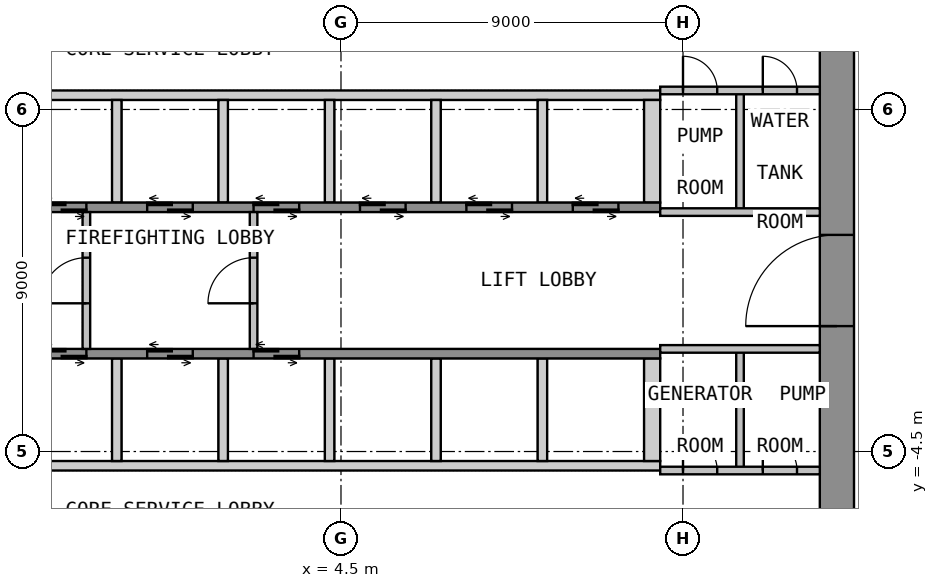
"""IFC4 building model, lengths in metres.
Left out: names, types, materials, properties, quantities, classifications, styles, units other than length and angle.
Written with IfcOpenShell. Run it as: python <this file> out.ifc"""

import sys

from ifc_helpers import new_model, si_unit, direction, frame, frame_2d, origin, place, context, subcontext, project, spatial, polyline, rectangle, outline, extrude, element, fill, save


model = new_model("IFC4")
c1 = context("Model", 3, precision=1e-05, world=origin(), true_north=direction((0.0, 1.0)))
c2 = subcontext(c1, "Body", "Model", "MODEL_VIEW")
j1 = project(units=[si_unit("LENGTHUNIT", "METRE"), si_unit("PLANEANGLEUNIT", "RADIAN")], contexts=[c1])
p1 = place(None, origin())
s1 = spatial("IfcSite", under=j1, at=p1, CompositionType="ELEMENT")
p2 = place(p1, origin())
s2 = spatial("IfcBuilding", under=s1, at=p2, CompositionType="ELEMENT")
p3 = place(p2, frame((0.0, 0.0, 76.8)))
s3 = spatial("IfcBuildingStorey", under=s2, at=p3, CompositionType="ELEMENT", Elevation=76.8)
p4 = place(p3, frame((17.55, -12.6, 0.0), z_axis=(0.0, 0.0, 1.0), x_axis=(0.0, 1.0, 0.0)))
e1 = element("IfcWall", 1, at=p4, inside=s3, PredefinedType="SHEAR", context=c2, shape_type="SweptSolid", body=[
    extrude(rectangle(XDim=25.2, YDim=0.9, at=frame_2d((12.6, 0.0))), origin(), (0.0, 0.0, 1.0), 4.125),
])
p5 = place(p4, frame((11.4, 0.0, 0.0)))
e2 = element("IfcOpeningElement", 2, at=p5, cuts=e1, PredefinedType="OPENING", context=c2, shape_type="SweptSolid", body=[
    extrude(rectangle(XDim=2.4, YDim=2.1, at=frame_2d((1.2, 1.05))), frame((0.0, 0.46, 0.0), z_axis=(0.0, -1.0, 0.0), x_axis=(1.0, 0.0, 0.0)), (0.0, 0.0, 1.0), 0.92),
])
p6 = place(p3, origin())
e3 = element("IfcWall", 3, at=p6, inside=s3, PredefinedType="SHEAR", context=c2, shape_type="SweptSolid", body=[
    extrude(outline(polyline([(-12.9, 4.75), (12.9, 4.75), (12.9, 5.0), (-12.9, 5.0), (-12.9, 4.75)])), origin(), (0.0, 0.0, 1.0), 4.125),
])
p7 = place(p3, origin())
e4 = element("IfcWall", 4, at=p7, inside=s3, PredefinedType="SHEAR", context=c2, shape_type="SweptSolid", body=[
    extrude(outline(polyline([(-1.525, 2.05), (-1.275, 2.05), (-1.275, 4.75), (-1.525, 4.75), (-1.525, 2.05)])), origin(), (0.0, 0.0, 1.0), 4.125),
])
p8 = place(p3, origin())
e5 = element("IfcWall", 5, at=p8, inside=s3, PredefinedType="SHEAR", context=c2, shape_type="SweptSolid", body=[
    extrude(outline(polyline([(1.275, 2.05), (1.525, 2.05), (1.525, 4.75), (1.275, 4.75), (1.275, 2.05)])), origin(), (0.0, 0.0, 1.0), 4.125),
])
p9 = place(p3, origin())
e6 = element("IfcWall", 6, at=p9, inside=s3, PredefinedType="SHEAR", context=c2, shape_type="SweptSolid", body=[
    extrude(outline(polyline([(4.075, 2.05), (4.325, 2.05), (4.325, 4.75), (4.075, 4.75), (4.075, 2.05)])), origin(), (0.0, 0.0, 1.0), 4.125),
])
p10 = place(p3, origin())
e7 = element("IfcWall", 7, at=p10, inside=s3, PredefinedType="SHEAR", context=c2, shape_type="SweptSolid", body=[
    extrude(outline(polyline([(6.875, 2.05), (7.125, 2.05), (7.125, 4.75), (6.875, 4.75), (6.875, 2.05)])), origin(), (0.0, 0.0, 1.0), 4.125),
])
p11 = place(p3, origin())
e8 = element("IfcWall", 8, at=p11, inside=s3, PredefinedType="SHEAR", context=c2, shape_type="SweptSolid", body=[
    extrude(outline(polyline([(9.675, 2.05), (9.925, 2.05), (9.925, 4.75), (9.675, 4.75), (9.675, 2.05)])), origin(), (0.0, 0.0, 1.0), 4.125),
])
p12 = place(p3, origin())
e9 = element("IfcWall", 9, at=p12, inside=s3, PredefinedType="SHEAR", context=c2, shape_type="SweptSolid", body=[
    extrude(outline(polyline([(12.475, 2.05), (12.9, 2.05), (12.9, 4.75), (12.475, 4.75), (12.475, 2.05)])), origin(), (0.0, 0.0, 1.0), 4.125),
])
p13 = place(p3, frame((-12.9, 1.925, 0.0), z_axis=(0.0, 0.0, 1.0), x_axis=(1.0, 0.0, 0.0)))
e10 = element("IfcWall", 10, at=p13, inside=s3, PredefinedType="SHEAR", context=c2, shape_type="SweptSolid", body=[
    extrude(rectangle(XDim=25.8, YDim=0.25, at=frame_2d((12.9, 0.0))), origin(), (0.0, 0.0, 1.0), 4.125),
])
p14 = place(p13, frame((9.5, 0.0, 0.0)))
e11 = element("IfcOpeningElement", 11, at=p14, cuts=e10, PredefinedType="OPENING", context=c2, shape_type="SweptSolid", body=[
    extrude(rectangle(XDim=1.2, YDim=2.1, at=frame_2d((0.6, 1.05))), frame((0.0, 0.135, 0.0), z_axis=(0.0, -1.0, 0.0), x_axis=(1.0, 0.0, 0.0)), (0.0, 0.0, 1.0), 0.27),
])
p15 = place(p13, frame((12.3, 0.0, 0.0)))
e12 = element("IfcOpeningElement", 12, at=p15, cuts=e10, PredefinedType="OPENING", context=c2, shape_type="SweptSolid", body=[
    extrude(rectangle(XDim=1.2, YDim=2.1, at=frame_2d((0.6, 1.05))), frame((0.0, 0.135, 0.0), z_axis=(0.0, -1.0, 0.0), x_axis=(1.0, 0.0, 0.0)), (0.0, 0.0, 1.0), 0.27),
])
p16 = place(p13, frame((15.1, 0.0, 0.0)))
e13 = element("IfcOpeningElement", 13, at=p16, cuts=e10, PredefinedType="OPENING", context=c2, shape_type="SweptSolid", body=[
    extrude(rectangle(XDim=1.2, YDim=2.1, at=frame_2d((0.6, 1.05))), frame((0.0, 0.135, 0.0), z_axis=(0.0, -1.0, 0.0), x_axis=(1.0, 0.0, 0.0)), (0.0, 0.0, 1.0), 0.27),
])
p17 = place(p13, frame((17.9, 0.0, 0.0)))
e14 = element("IfcOpeningElement", 14, at=p17, cuts=e10, PredefinedType="OPENING", context=c2, shape_type="SweptSolid", body=[
    extrude(rectangle(XDim=1.2, YDim=2.1, at=frame_2d((0.6, 1.05))), frame((0.0, 0.135, 0.0), z_axis=(0.0, -1.0, 0.0), x_axis=(1.0, 0.0, 0.0)), (0.0, 0.0, 1.0), 0.27),
])
p18 = place(p13, frame((20.7, 0.0, 0.0)))
e15 = element("IfcOpeningElement", 15, at=p18, cuts=e10, PredefinedType="OPENING", context=c2, shape_type="SweptSolid", body=[
    extrude(rectangle(XDim=1.2, YDim=2.1, at=frame_2d((0.6, 1.05))), frame((0.0, 0.135, 0.0), z_axis=(0.0, -1.0, 0.0), x_axis=(1.0, 0.0, 0.0)), (0.0, 0.0, 1.0), 0.27),
])
p19 = place(p13, frame((23.5, 0.0, 0.0)))
e16 = element("IfcOpeningElement", 16, at=p19, cuts=e10, PredefinedType="OPENING", context=c2, shape_type="SweptSolid", body=[
    extrude(rectangle(XDim=1.2, YDim=2.1, at=frame_2d((0.6, 1.05))), frame((0.0, 0.135, 0.0), z_axis=(0.0, -1.0, 0.0), x_axis=(1.0, 0.0, 0.0)), (0.0, 0.0, 1.0), 0.27),
])
p20 = place(p3, origin())
e17 = element("IfcWall", 17, at=p20, inside=s3, PredefinedType="SHEAR", context=c2, shape_type="SweptSolid", body=[
    extrude(outline(polyline([(-12.9, -5.0), (12.9, -5.0), (12.9, -4.75), (-12.9, -4.75), (-12.9, -5.0)])), origin(), (0.0, 0.0, 1.0), 4.125),
])
p21 = place(p3, origin())
e18 = element("IfcWall", 18, at=p21, inside=s3, PredefinedType="SHEAR", context=c2, shape_type="SweptSolid", body=[
    extrude(outline(polyline([(-1.525, -4.75), (-1.275, -4.75), (-1.275, -2.05), (-1.525, -2.05), (-1.525, -4.75)])), origin(), (0.0, 0.0, 1.0), 4.125),
])
p22 = place(p3, origin())
e19 = element("IfcWall", 19, at=p22, inside=s3, PredefinedType="SHEAR", context=c2, shape_type="SweptSolid", body=[
    extrude(outline(polyline([(1.275, -4.75), (1.525, -4.75), (1.525, -2.05), (1.275, -2.05), (1.275, -4.75)])), origin(), (0.0, 0.0, 1.0), 4.125),
])
p23 = place(p3, origin())
e20 = element("IfcWall", 20, at=p23, inside=s3, PredefinedType="SHEAR", context=c2, shape_type="SweptSolid", body=[
    extrude(outline(polyline([(4.075, -4.75), (4.325, -4.75), (4.325, -2.05), (4.075, -2.05), (4.075, -4.75)])), origin(), (0.0, 0.0, 1.0), 4.125),
])
p24 = place(p3, origin())
e21 = element("IfcWall", 21, at=p24, inside=s3, PredefinedType="SHEAR", context=c2, shape_type="SweptSolid", body=[
    extrude(outline(polyline([(6.875, -4.75), (7.125, -4.75), (7.125, -2.05), (6.875, -2.05), (6.875, -4.75)])), origin(), (0.0, 0.0, 1.0), 4.125),
])
p25 = place(p3, origin())
e22 = element("IfcWall", 22, at=p25, inside=s3, PredefinedType="SHEAR", context=c2, shape_type="SweptSolid", body=[
    extrude(outline(polyline([(9.675, -4.75), (9.925, -4.75), (9.925, -2.05), (9.675, -2.05), (9.675, -4.75)])), origin(), (0.0, 0.0, 1.0), 4.125),
])
p26 = place(p3, origin())
e23 = element("IfcWall", 23, at=p26, inside=s3, PredefinedType="SHEAR", context=c2, shape_type="SweptSolid", body=[
    extrude(outline(polyline([(12.475, -4.75), (12.9, -4.75), (12.9, -2.05), (12.475, -2.05), (12.475, -4.75)])), origin(), (0.0, 0.0, 1.0), 4.125),
])
p27 = place(p3, frame((-12.9, -1.925, 0.0), z_axis=(0.0, 0.0, 1.0), x_axis=(1.0, 0.0, 0.0)))
e24 = element("IfcWall", 24, at=p27, inside=s3, PredefinedType="SHEAR", context=c2, shape_type="SweptSolid", body=[
    extrude(rectangle(XDim=25.8, YDim=0.25, at=frame_2d((12.9, 0.0))), origin(), (0.0, 0.0, 1.0), 4.125),
])
p28 = place(p27, frame((1.1, 0.0, 0.0)))
e25 = element("IfcOpeningElement", 25, at=p28, cuts=e24, PredefinedType="OPENING", context=c2, shape_type="SweptSolid", body=[
    extrude(rectangle(XDim=1.2, YDim=2.1, at=frame_2d((0.6, 1.05))), frame((0.0, 0.135, 0.0), z_axis=(0.0, -1.0, 0.0), x_axis=(1.0, 0.0, 0.0)), (0.0, 0.0, 1.0), 0.27),
])
p29 = place(p27, frame((3.9, 0.0, 0.0)))
e26 = element("IfcOpeningElement", 26, at=p29, cuts=e24, PredefinedType="OPENING", context=c2, shape_type="SweptSolid", body=[
    extrude(rectangle(XDim=1.2, YDim=2.1, at=frame_2d((0.6, 1.05))), frame((0.0, 0.135, 0.0), z_axis=(0.0, -1.0, 0.0), x_axis=(1.0, 0.0, 0.0)), (0.0, 0.0, 1.0), 0.27),
])
p30 = place(p27, frame((6.7, 0.0, 0.0)))
e27 = element("IfcOpeningElement", 27, at=p30, cuts=e24, PredefinedType="OPENING", context=c2, shape_type="SweptSolid", body=[
    extrude(rectangle(XDim=1.2, YDim=2.1, at=frame_2d((0.6, 1.05))), frame((0.0, 0.135, 0.0), z_axis=(0.0, -1.0, 0.0), x_axis=(1.0, 0.0, 0.0)), (0.0, 0.0, 1.0), 0.27),
])
p31 = place(p27, frame((9.5, 0.0, 0.0)))
e28 = element("IfcOpeningElement", 28, at=p31, cuts=e24, PredefinedType="OPENING", context=c2, shape_type="SweptSolid", body=[
    extrude(rectangle(XDim=1.2, YDim=2.1, at=frame_2d((0.6, 1.05))), frame((0.0, 0.135, 0.0), z_axis=(0.0, -1.0, 0.0), x_axis=(1.0, 0.0, 0.0)), (0.0, 0.0, 1.0), 0.27),
])
p32 = place(p27, frame((12.3, 0.0, 0.0)))
e29 = element("IfcOpeningElement", 29, at=p32, cuts=e24, PredefinedType="OPENING", context=c2, shape_type="SweptSolid", body=[
    extrude(rectangle(XDim=1.2, YDim=2.1, at=frame_2d((0.6, 1.05))), frame((0.0, 0.135, 0.0), z_axis=(0.0, -1.0, 0.0), x_axis=(1.0, 0.0, 0.0)), (0.0, 0.0, 1.0), 0.27),
])
p33 = place(p27, frame((15.1, 0.0, 0.0)))
e30 = element("IfcOpeningElement", 30, at=p33, cuts=e24, PredefinedType="OPENING", context=c2, shape_type="SweptSolid", body=[
    extrude(rectangle(XDim=1.2, YDim=2.1, at=frame_2d((0.6, 1.05))), frame((0.0, 0.135, 0.0), z_axis=(0.0, -1.0, 0.0), x_axis=(1.0, 0.0, 0.0)), (0.0, 0.0, 1.0), 0.27),
])
p34 = place(p3, frame((-2.2, -1.8, 0.0), z_axis=(0.0, 0.0, 1.0), x_axis=(0.0, 1.0, 0.0)))
e31 = element("IfcWall", 31, at=p34, inside=s3, PredefinedType="PARTITIONING", context=c2, shape_type="SweptSolid", body=[
    extrude(rectangle(XDim=3.6, YDim=0.2, at=frame_2d((1.8, 0.0))), origin(), (0.0, 0.0, 1.0), 4.125),
])
p35 = place(p34, frame((1.2, 0.0, 0.0)))
e32 = element("IfcOpeningElement", 32, at=p35, cuts=e31, PredefinedType="OPENING", context=c2, shape_type="SweptSolid", body=[
    extrude(rectangle(XDim=1.2, YDim=2.1, at=frame_2d((0.6, 1.05))), frame((0.0, 0.11, 0.0), z_axis=(0.0, -1.0, 0.0), x_axis=(1.0, 0.0, 0.0)), (0.0, 0.0, 1.0), 0.22),
])
p36 = place(p3, frame((2.2, -1.8, 0.0), z_axis=(0.0, 0.0, 1.0), x_axis=(0.0, 1.0, 0.0)))
e33 = element("IfcWall", 33, at=p36, inside=s3, PredefinedType="PARTITIONING", context=c2, shape_type="SweptSolid", body=[
    extrude(rectangle(XDim=3.6, YDim=0.2, at=frame_2d((1.8, 0.0))), origin(), (0.0, 0.0, 1.0), 4.125),
])
p37 = place(p36, frame((1.2, 0.0, 0.0)))
e34 = element("IfcOpeningElement", 34, at=p37, cuts=e33, PredefinedType="OPENING", context=c2, shape_type="SweptSolid", body=[
    extrude(rectangle(XDim=1.2, YDim=2.1, at=frame_2d((0.6, 1.05))), frame((0.0, 0.11, 0.0), z_axis=(0.0, -1.0, 0.0), x_axis=(1.0, 0.0, 0.0)), (0.0, 0.0, 1.0), 0.22),
])
p38 = place(p3, frame((15.0, 1.8, 0.0), z_axis=(0.0, 0.0, 1.0), x_axis=(0.0, 1.0, 0.0)))
e35 = element("IfcWall", 35, at=p38, inside=s3, PredefinedType="PARTITIONING", context=c2, shape_type="SweptSolid", body=[
    extrude(rectangle(XDim=3.2, YDim=0.2, at=frame_2d((1.6, 0.0))), origin(), (0.0, 0.0, 1.0), 4.125),
])
p39 = place(p3, frame((12.9, 5.0, 0.0), z_axis=(0.0, 0.0, 1.0), x_axis=(1.0, 0.0, 0.0)))
e36 = element("IfcWall", 36, at=p39, inside=s3, PredefinedType="PARTITIONING", context=c2, shape_type="SweptSolid", body=[
    extrude(rectangle(XDim=4.2, YDim=0.2, at=frame_2d((2.1, 0.0))), origin(), (0.0, 0.0, 1.0), 4.125),
])
p40 = place(p39, frame((0.6, 0.0, 0.0)))
e37 = element("IfcOpeningElement", 37, at=p40, cuts=e36, PredefinedType="OPENING", context=c2, shape_type="SweptSolid", body=[
    extrude(rectangle(XDim=0.9, YDim=2.1, at=frame_2d((0.45, 1.05))), frame((0.0, 0.11, 0.0), z_axis=(0.0, -1.0, 0.0), x_axis=(1.0, 0.0, 0.0)), (0.0, 0.0, 1.0), 0.22),
])
p41 = place(p39, frame((2.7, 0.0, 0.0)))
e38 = element("IfcOpeningElement", 38, at=p41, cuts=e36, PredefinedType="OPENING", context=c2, shape_type="SweptSolid", body=[
    extrude(rectangle(XDim=0.9, YDim=2.1, at=frame_2d((0.45, 1.05))), frame((0.0, 0.11, 0.0), z_axis=(0.0, -1.0, 0.0), x_axis=(1.0, 0.0, 0.0)), (0.0, 0.0, 1.0), 0.22),
])
p42 = place(p3, frame((12.9, 1.8, 0.0), z_axis=(0.0, 0.0, 1.0), x_axis=(1.0, 0.0, 0.0)))
e39 = element("IfcWall", 39, at=p42, inside=s3, PredefinedType="PARTITIONING", context=c2, shape_type="SweptSolid", body=[
    extrude(rectangle(XDim=4.2, YDim=0.2, at=frame_2d((2.1, 0.0))), origin(), (0.0, 0.0, 1.0), 4.125),
])
p43 = place(p3, frame((15.0, -5.0, 0.0), z_axis=(0.0, 0.0, 1.0), x_axis=(0.0, 1.0, 0.0)))
e40 = element("IfcWall", 40, at=p43, inside=s3, PredefinedType="PARTITIONING", context=c2, shape_type="SweptSolid", body=[
    extrude(rectangle(XDim=3.2, YDim=0.2, at=frame_2d((1.6, 0.0))), origin(), (0.0, 0.0, 1.0), 4.125),
])
p44 = place(p3, frame((12.9, -5.0, 0.0), z_axis=(0.0, 0.0, 1.0), x_axis=(1.0, 0.0, 0.0)))
e41 = element("IfcWall", 41, at=p44, inside=s3, PredefinedType="PARTITIONING", context=c2, shape_type="SweptSolid", body=[
    extrude(rectangle(XDim=4.2, YDim=0.2, at=frame_2d((2.1, 0.0))), origin(), (0.0, 0.0, 1.0), 4.125),
])
p45 = place(p44, frame((0.6, 0.0, 0.0)))
e42 = element("IfcOpeningElement", 42, at=p45, cuts=e41, PredefinedType="OPENING", context=c2, shape_type="SweptSolid", body=[
    extrude(rectangle(XDim=0.9, YDim=2.1, at=frame_2d((0.45, 1.05))), frame((0.0, 0.11, 0.0), z_axis=(0.0, -1.0, 0.0), x_axis=(1.0, 0.0, 0.0)), (0.0, 0.0, 1.0), 0.22),
])
p46 = place(p44, frame((2.7, 0.0, 0.0)))
e43 = element("IfcOpeningElement", 43, at=p46, cuts=e41, PredefinedType="OPENING", context=c2, shape_type="SweptSolid", body=[
    extrude(rectangle(XDim=0.9, YDim=2.1, at=frame_2d((0.45, 1.05))), frame((0.0, 0.11, 0.0), z_axis=(0.0, -1.0, 0.0), x_axis=(1.0, 0.0, 0.0)), (0.0, 0.0, 1.0), 0.22),
])
p47 = place(p3, frame((12.9, -1.8, 0.0), z_axis=(0.0, 0.0, 1.0), x_axis=(1.0, 0.0, 0.0)))
e44 = element("IfcWall", 44, at=p47, inside=s3, PredefinedType="PARTITIONING", context=c2, shape_type="SweptSolid", body=[
    extrude(rectangle(XDim=4.2, YDim=0.2, at=frame_2d((2.1, 0.0))), origin(), (0.0, 0.0, 1.0), 4.125),
])
p48 = place(p5, origin())
e45 = element("IfcDoor", 45, at=p48, inside=s3, OperationType="DOUBLE_DOOR_DOUBLE_SWING", PredefinedType="DOOR", context=c2, shape_type="SweptSolid", body=[
    extrude(rectangle(XDim=2.4, YDim=2.1, at=frame_2d((1.2, 1.05))), frame((0.0, 0.025, 0.0), z_axis=(0.0, -1.0, 0.0), x_axis=(1.0, 0.0, 0.0)), (0.0, 0.0, 1.0), 0.05),
])
fill(e2, e45)
p49 = place(p14, origin())
e46 = element("IfcDoor", 46, at=p49, inside=s3, OperationType="DOUBLE_DOOR_SLIDING", PredefinedType="DOOR", context=c2, shape_type="SweptSolid", body=[
    extrude(rectangle(XDim=1.2, YDim=2.1, at=frame_2d((0.6, 1.05))), frame((0.0, 0.025, 0.0), z_axis=(0.0, -1.0, 0.0), x_axis=(1.0, 0.0, 0.0)), (0.0, 0.0, 1.0), 0.05),
])
fill(e11, e46)
p50 = place(p15, origin())
e47 = element("IfcDoor", 47, at=p50, inside=s3, OperationType="DOUBLE_DOOR_SLIDING", PredefinedType="DOOR", context=c2, shape_type="SweptSolid", body=[
    extrude(rectangle(XDim=1.2, YDim=2.1, at=frame_2d((0.6, 1.05))), frame((0.0, 0.025, 0.0), z_axis=(0.0, -1.0, 0.0), x_axis=(1.0, 0.0, 0.0)), (0.0, 0.0, 1.0), 0.05),
])
fill(e12, e47)
p51 = place(p16, origin())
e48 = element("IfcDoor", 48, at=p51, inside=s3, OperationType="DOUBLE_DOOR_SLIDING", PredefinedType="DOOR", context=c2, shape_type="SweptSolid", body=[
    extrude(rectangle(XDim=1.2, YDim=2.1, at=frame_2d((0.6, 1.05))), frame((0.0, 0.025, 0.0), z_axis=(0.0, -1.0, 0.0), x_axis=(1.0, 0.0, 0.0)), (0.0, 0.0, 1.0), 0.05),
])
fill(e13, e48)
p52 = place(p17, origin())
e49 = element("IfcDoor", 49, at=p52, inside=s3, OperationType="DOUBLE_DOOR_SLIDING", PredefinedType="DOOR", context=c2, shape_type="SweptSolid", body=[
    extrude(rectangle(XDim=1.2, YDim=2.1, at=frame_2d((0.6, 1.05))), frame((0.0, 0.025, 0.0), z_axis=(0.0, -1.0, 0.0), x_axis=(1.0, 0.0, 0.0)), (0.0, 0.0, 1.0), 0.05),
])
fill(e14, e49)
p53 = place(p18, origin())
e50 = element("IfcDoor", 50, at=p53, inside=s3, OperationType="DOUBLE_DOOR_SLIDING", PredefinedType="DOOR", context=c2, shape_type="SweptSolid", body=[
    extrude(rectangle(XDim=1.2, YDim=2.1, at=frame_2d((0.6, 1.05))), frame((0.0, 0.025, 0.0), z_axis=(0.0, -1.0, 0.0), x_axis=(1.0, 0.0, 0.0)), (0.0, 0.0, 1.0), 0.05),
])
fill(e15, e50)
p54 = place(p19, origin())
e51 = element("IfcDoor", 51, at=p54, inside=s3, OperationType="DOUBLE_DOOR_SLIDING", PredefinedType="DOOR", context=c2, shape_type="SweptSolid", body=[
    extrude(rectangle(XDim=1.2, YDim=2.1, at=frame_2d((0.6, 1.05))), frame((0.0, 0.025, 0.0), z_axis=(0.0, -1.0, 0.0), x_axis=(1.0, 0.0, 0.0)), (0.0, 0.0, 1.0), 0.05),
])
fill(e16, e51)
p55 = place(p31, origin())
e52 = element("IfcDoor", 52, at=p55, inside=s3, OperationType="DOUBLE_DOOR_SLIDING", PredefinedType="DOOR", context=c2, shape_type="SweptSolid", body=[
    extrude(rectangle(XDim=1.2, YDim=2.1, at=frame_2d((0.6, 1.05))), frame((0.0, 0.025, 0.0), z_axis=(0.0, -1.0, 0.0), x_axis=(1.0, 0.0, 0.0)), (0.0, 0.0, 1.0), 0.05),
])
fill(e28, e52)
p56 = place(p32, origin())
e53 = element("IfcDoor", 53, at=p56, inside=s3, OperationType="DOUBLE_DOOR_SLIDING", PredefinedType="DOOR", context=c2, shape_type="SweptSolid", body=[
    extrude(rectangle(XDim=1.2, YDim=2.1, at=frame_2d((0.6, 1.05))), frame((0.0, 0.025, 0.0), z_axis=(0.0, -1.0, 0.0), x_axis=(1.0, 0.0, 0.0)), (0.0, 0.0, 1.0), 0.05),
])
fill(e29, e53)
p57 = place(p33, origin())
e54 = element("IfcDoor", 54, at=p57, inside=s3, OperationType="DOUBLE_DOOR_SLIDING", PredefinedType="DOOR", context=c2, shape_type="SweptSolid", body=[
    extrude(rectangle(XDim=1.2, YDim=2.1, at=frame_2d((0.6, 1.05))), frame((0.0, 0.025, 0.0), z_axis=(0.0, -1.0, 0.0), x_axis=(1.0, 0.0, 0.0)), (0.0, 0.0, 1.0), 0.05),
])
fill(e30, e54)
p58 = place(p35, origin())
e55 = element("IfcDoor", 55, at=p58, inside=s3, OperationType="SINGLE_SWING_LEFT", PredefinedType="DOOR", context=c2, shape_type="SweptSolid", body=[
    extrude(rectangle(XDim=1.2, YDim=2.1, at=frame_2d((0.6, 1.05))), frame((0.0, 0.025, 0.0), z_axis=(0.0, -1.0, 0.0), x_axis=(1.0, 0.0, 0.0)), (0.0, 0.0, 1.0), 0.05),
])
fill(e32, e55)
p59 = place(p37, origin())
e56 = element("IfcDoor", 56, at=p59, inside=s3, OperationType="SINGLE_SWING_LEFT", PredefinedType="DOOR", context=c2, shape_type="SweptSolid", body=[
    extrude(rectangle(XDim=1.2, YDim=2.1, at=frame_2d((0.6, 1.05))), frame((0.0, 0.025, 0.0), z_axis=(0.0, -1.0, 0.0), x_axis=(1.0, 0.0, 0.0)), (0.0, 0.0, 1.0), 0.05),
])
fill(e34, e56)
p60 = place(p40, origin())
e57 = element("IfcDoor", 57, at=p60, inside=s3, OperationType="SINGLE_SWING_LEFT", PredefinedType="DOOR", context=c2, shape_type="SweptSolid", body=[
    extrude(rectangle(XDim=0.9, YDim=2.1, at=frame_2d((0.45, 1.05))), frame((0.0, 0.025, 0.0), z_axis=(0.0, -1.0, 0.0), x_axis=(1.0, 0.0, 0.0)), (0.0, 0.0, 1.0), 0.05),
])
fill(e37, e57)
p61 = place(p41, origin())
e58 = element("IfcDoor", 58, at=p61, inside=s3, OperationType="SINGLE_SWING_LEFT", PredefinedType="DOOR", context=c2, shape_type="SweptSolid", body=[
    extrude(rectangle(XDim=0.9, YDim=2.1, at=frame_2d((0.45, 1.05))), frame((0.0, 0.025, 0.0), z_axis=(0.0, -1.0, 0.0), x_axis=(1.0, 0.0, 0.0)), (0.0, 0.0, 1.0), 0.05),
])
fill(e38, e58)
p62 = place(p45, origin())
e59 = element("IfcDoor", 59, at=p62, inside=s3, OperationType="SINGLE_SWING_LEFT", PredefinedType="DOOR", context=c2, shape_type="SweptSolid", body=[
    extrude(rectangle(XDim=0.9, YDim=2.1, at=frame_2d((0.45, 1.05))), frame((0.0, 0.025, 0.0), z_axis=(0.0, -1.0, 0.0), x_axis=(1.0, 0.0, 0.0)), (0.0, 0.0, 1.0), 0.05),
])
fill(e42, e59)
p63 = place(p46, origin())
e60 = element("IfcDoor", 60, at=p63, inside=s3, OperationType="SINGLE_SWING_LEFT", PredefinedType="DOOR", context=c2, shape_type="SweptSolid", body=[
    extrude(rectangle(XDim=0.9, YDim=2.1, at=frame_2d((0.45, 1.05))), frame((0.0, 0.025, 0.0), z_axis=(0.0, -1.0, 0.0), x_axis=(1.0, 0.0, 0.0)), (0.0, 0.0, 1.0), 0.05),
])
fill(e43, e60)
save(model, sys.argv[1])
